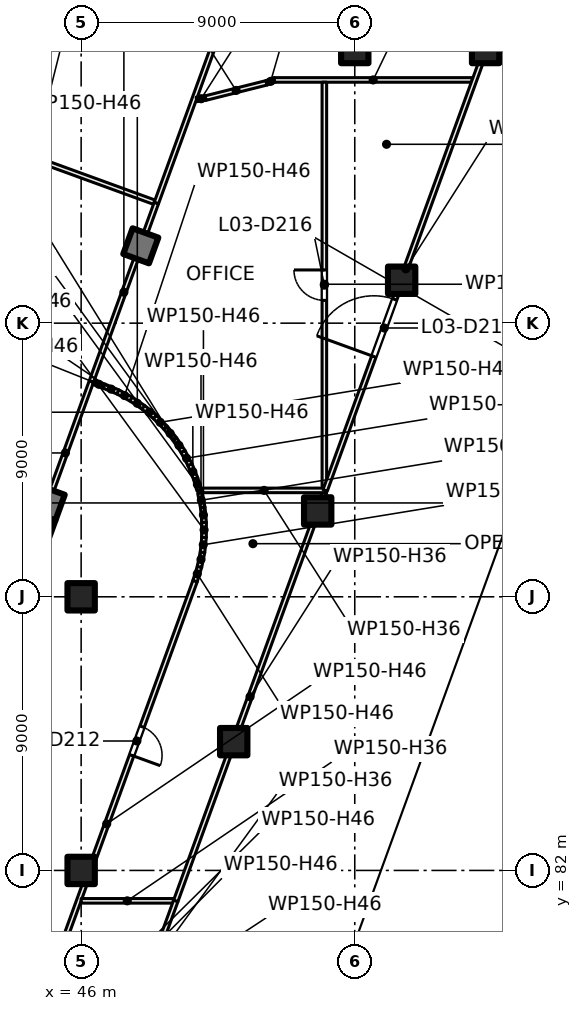
"""IFC4 building model, lengths in metres.
Left out: names, types, materials, properties, quantities, classifications, styles, units other than length and angle.
Written with IfcOpenShell. Run it as: python <this file> out.ifc"""

import sys

from ifc_helpers import new_model, si_unit, direction, frame, frame_2d, origin, origin_2d, place, context, subcontext, project, spatial, rectangle, extrude, element, fill, save


model = new_model("IFC4")
c1 = context("Model", 3, precision=1e-05, world=origin(), true_north=direction((0.0, 1.0)))
c2 = subcontext(c1, "Body", "Model", "MODEL_VIEW")
j1 = project(units=[si_unit("LENGTHUNIT", "METRE"), si_unit("PLANEANGLEUNIT", "RADIAN")], contexts=[c1])
p1 = place(None, origin())
s1 = spatial("IfcSite", under=j1, at=p1, CompositionType="ELEMENT")
p2 = place(p1, origin())
s2 = spatial("IfcBuilding", under=s1, at=p2, CompositionType="ELEMENT")
p3 = place(p2, frame((0.0, 0.0, 17.5)))
s3 = spatial("IfcBuildingStorey", under=s2, at=p3, CompositionType="ELEMENT", Elevation=17.5)
for number, where, z_axis, x_axis in (
    (1, (46.0, 82.0, 0.0), (0.0, 0.0, 1.0), (1.0, 0.0, 0.0)),
    (2, (46.0, 91.0, 0.0), (0.0, 0.0, 1.0), (1.0, 0.0, 0.0)),
    (3, (55.0, 109.0, 0.0), (0.0, 0.0, 1.0), (1.0, 0.0, 0.0)),
    (4, (51.019, 86.236, 0.0), (0.0, 0.0, 1.0), (1.0, 0.0, 0.0)),
    (5, (53.78, 93.824, 0.0), (0.0, 0.0, 1.0), (1.0, 0.0, 0.0)),
    (6, (56.542, 101.412, 0.0), (0.0, 0.0, 1.0), (1.0, 0.0, 0.0)),
    (7, (59.304, 109.0, 0.0), (0.0, 0.0, 1.0), (1.0, 0.0, 0.0)),
    (8, (47.962, 102.544, 0.0), (0.0, 0.0, 1.0), (-0.342, -0.94, 0.0)),
    (9, (44.884, 94.087, 0.0), (0.0, 0.0, 1.0), (-0.342, -0.94, 0.0)),
):
    element("IfcColumn", number, at=place(p3, frame(where, z_axis=z_axis, x_axis=x_axis)), inside=s3, PredefinedType="COLUMN", context=c2, shape_type="SweptSolid", body=[
        extrude(rectangle(XDim=0.9, YDim=0.9, at=origin_2d()), origin(), (0.0, 0.0, 1.0), 5.0),
    ])
p4 = place(p3, frame((41.827, 85.249, 0.0), z_axis=(0.0, 0.0, 1.0), x_axis=(0.342016162452, 0.939694069696, 0.0)))
e10 = element("IfcWall", 10, at=p4, inside=s3, PredefinedType="SHEAR", context=c2, shape_type="SweptSolid", body=[
    extrude(rectangle(XDim=8.9, YDim=0.6, at=frame_2d((4.45, 0.0))), origin(), (0.0, 0.0, 1.0), 5.0),
])
p5 = place(p3, frame((110.368, 100.798, 0.0), z_axis=(0.0, 0.0, 1.0), x_axis=(-0.866702553925, -0.498825303107, 0.0)))
e11 = element("IfcWall", 11, at=p5, inside=s3, PredefinedType="SOLIDWALL", context=c2, shape_type="SweptSolid", body=[
    extrude(rectangle(XDim=66.651, YDim=0.6, at=frame_2d((33.325, 0.0))), origin(), (0.0, 0.0, 1.0), 4.6),
])
p6 = place(p5, frame((0.794, 0.0, 0.9)))
e12 = element("IfcOpeningElement", 12, at=p6, cuts=e11, PredefinedType="OPENING", context=c2, shape_type="SweptSolid", body=[
    extrude(rectangle(XDim=3.0, YDim=3.0, at=frame_2d((1.5, 1.5))), frame((0.0, 0.31, 0.0), z_axis=(0.0, -1.0, 0.0), x_axis=(1.0, 0.0, 0.0)), (0.0, 0.0, 1.0), 0.62),
])
p7 = place(p5, frame((9.542, 0.0, 0.9)))
e13 = element("IfcOpeningElement", 13, at=p7, cuts=e11, PredefinedType="OPENING", context=c2, shape_type="SweptSolid", body=[
    extrude(rectangle(XDim=3.0, YDim=3.0, at=frame_2d((1.5, 1.5))), frame((0.0, 0.31, 0.0), z_axis=(0.0, -1.0, 0.0), x_axis=(1.0, 0.0, 0.0)), (0.0, 0.0, 1.0), 0.62),
])
p8 = place(p5, frame((18.439, 0.0, 0.9)))
e14 = element("IfcOpeningElement", 14, at=p8, cuts=e11, PredefinedType="OPENING", context=c2, shape_type="SweptSolid", body=[
    extrude(rectangle(XDim=3.0, YDim=3.0, at=frame_2d((1.5, 1.5))), frame((0.0, 0.31, 0.0), z_axis=(0.0, -1.0, 0.0), x_axis=(1.0, 0.0, 0.0)), (0.0, 0.0, 1.0), 0.62),
])
p9 = place(p5, frame((27.337, 0.0, 0.9)))
e15 = element("IfcOpeningElement", 15, at=p9, cuts=e11, PredefinedType="OPENING", context=c2, shape_type="SweptSolid", body=[
    extrude(rectangle(XDim=3.0, YDim=3.0, at=frame_2d((1.5, 1.5))), frame((0.0, 0.31, 0.0), z_axis=(0.0, -1.0, 0.0), x_axis=(1.0, 0.0, 0.0)), (0.0, 0.0, 1.0), 0.62),
])
p10 = place(p5, frame((36.234, 0.0, 0.9)))
e16 = element("IfcOpeningElement", 16, at=p10, cuts=e11, PredefinedType="OPENING", context=c2, shape_type="SweptSolid", body=[
    extrude(rectangle(XDim=3.0, YDim=3.0, at=frame_2d((1.5, 1.5))), frame((0.0, 0.31, 0.0), z_axis=(0.0, -1.0, 0.0), x_axis=(1.0, 0.0, 0.0)), (0.0, 0.0, 1.0), 0.62),
])
p11 = place(p5, frame((45.131, 0.0, 0.9)))
e17 = element("IfcOpeningElement", 17, at=p11, cuts=e11, PredefinedType="OPENING", context=c2, shape_type="SweptSolid", body=[
    extrude(rectangle(XDim=3.0, YDim=3.0, at=frame_2d((1.5, 1.5))), frame((0.0, 0.31, 0.0), z_axis=(0.0, -1.0, 0.0), x_axis=(1.0, 0.0, 0.0)), (0.0, 0.0, 1.0), 0.62),
])
p12 = place(p5, frame((54.029, 0.0, 0.9)))
e18 = element("IfcOpeningElement", 18, at=p12, cuts=e11, PredefinedType="OPENING", context=c2, shape_type="SweptSolid", body=[
    extrude(rectangle(XDim=3.0, YDim=3.0, at=frame_2d((1.5, 1.5))), frame((0.0, 0.31, 0.0), z_axis=(0.0, -1.0, 0.0), x_axis=(1.0, 0.0, 0.0)), (0.0, 0.0, 1.0), 0.62),
])
p13 = place(p5, frame((62.776, 0.0, 0.9)))
e19 = element("IfcOpeningElement", 19, at=p13, cuts=e11, PredefinedType="OPENING", context=c2, shape_type="SweptSolid", body=[
    extrude(rectangle(XDim=3.0, YDim=3.0, at=frame_2d((1.5, 1.5))), frame((0.0, 0.31, 0.0), z_axis=(0.0, -1.0, 0.0), x_axis=(1.0, 0.0, 0.0)), (0.0, 0.0, 1.0), 0.62),
])
p14 = place(p3, frame((45.058, 119.563, 0.0), z_axis=(0.0, 0.0, 1.0), x_axis=(-0.342099992172, -0.93966355434, 0.0)))
e20 = element("IfcWall", 20, at=p14, inside=s3, PredefinedType="PARTITIONING", context=c2, shape_type="SweptSolid", body=[
    extrude(rectangle(XDim=13.4, YDim=0.2, at=frame_2d((6.7, 0.0))), origin(), (0.0, 0.0, 1.0), 4.6),
])
p15 = place(p14, frame((4.0, 0.0, 0.0)))
e21 = element("IfcOpeningElement", 21, at=p15, cuts=e20, PredefinedType="OPENING", context=c2, shape_type="SweptSolid", body=[
    extrude(rectangle(XDim=1.0, YDim=2.1, at=frame_2d((0.5, 1.05))), frame((0.0, 0.11, 0.0), z_axis=(0.0, -1.0, 0.0), x_axis=(1.0, 0.0, 0.0)), (0.0, 0.0, 1.0), 0.22),
])
p16 = place(p3, frame((40.44, 106.878, 0.0), z_axis=(0.0, 0.0, 1.0), x_axis=(0.939697516706, -0.342006691597, 0.0)))
e22 = element("IfcWall", 22, at=p16, inside=s3, PredefinedType="PARTITIONING", context=c2, shape_type="SweptSolid", body=[
    extrude(rectangle(XDim=8.476, YDim=0.15, at=frame_2d((4.238, 0.0))), origin(), (0.0, 0.0, 1.0), 4.6),
])
p17 = place(p3, frame((49.749, 91.52, 0.0), z_axis=(0.0, 0.0, 1.0), x_axis=(-0.342022021776, -0.939691937084, 0.0)))
e23 = element("IfcWall", 23, at=p17, inside=s3, PredefinedType="PARTITIONING", context=c2, shape_type="SweptSolid", body=[
    extrude(rectangle(XDim=17.004, YDim=0.15, at=frame_2d((8.502, 0.0))), origin(), (0.0, 0.0, 1.0), 4.6),
])
p18 = place(p17, frame((13.597, 0.0, 0.0)))
e24 = element("IfcOpeningElement", 24, at=p18, cuts=e23, PredefinedType="OPENING", context=c2, shape_type="SweptSolid", body=[
    extrude(rectangle(XDim=1.0, YDim=2.1, at=frame_2d((0.5, 1.05))), frame((0.0, 0.085, 0.0), z_axis=(0.0, -1.0, 0.0), x_axis=(1.0, 0.0, 0.0)), (0.0, 0.0, 1.0), 0.17),
])
p19 = place(p17, frame((5.101, 0.0, 0.0)))
e25 = element("IfcOpeningElement", 25, at=p19, cuts=e23, PredefinedType="OPENING", context=c2, shape_type="SweptSolid", body=[
    extrude(rectangle(XDim=1.0, YDim=2.1, at=frame_2d((0.5, 1.05))), frame((0.0, 0.085, 0.0), z_axis=(0.0, -1.0, 0.0), x_axis=(1.0, 0.0, 0.0)), (0.0, 0.0, 1.0), 0.17),
])
p20 = place(p3, frame((44.627, 93.382, 0.0), z_axis=(0.0, 0.0, 1.0), x_axis=(0.342025351501, 0.939690725149, 0.0)))
e26 = element("IfcWall", 26, at=p20, inside=s3, PredefinedType="PARTITIONING", context=c2, shape_type="SweptSolid", body=[
    extrude(rectangle(XDim=5.0, YDim=0.15, at=frame_2d((2.5, 0.0))), origin(), (0.0, 0.0, 1.0), 4.6),
])
p21 = place(p3, frame((46.0, 81.0, 0.0), z_axis=(0.0, 0.0, 1.0), x_axis=(1.0, 0.0, 0.0)))
e27 = element("IfcWall", 27, at=p21, inside=s3, PredefinedType="PARTITIONING", context=c2, shape_type="SweptSolid", body=[
    extrude(rectangle(XDim=3.033, YDim=0.15, at=frame_2d((1.517, 0.0))), origin(), (0.0, 0.0, 1.0), 3.6),
])
p22 = place(p3, frame((46.407, 98.054, 0.0), z_axis=(0.0, 0.0, 1.0), x_axis=(0.939944328342, -0.341327789109, 0.0)))
e28 = element("IfcWall", 28, at=p22, inside=s3, PredefinedType="PARTITIONING", context=c2, shape_type="SweptSolid", body=[
    extrude(rectangle(XDim=0.378, YDim=0.15, at=frame_2d((0.189, 0.0))), origin(), (0.0, 0.0, 1.0), 4.6),
])
p23 = place(p3, frame((46.337, 98.08, 0.0), z_axis=(0.0, 0.0, 1.0), x_axis=(0.342113136459, 0.939658768842, 0.0)))
e29 = element("IfcWall", 29, at=p23, inside=s3, PredefinedType="PARTITIONING", context=c2, shape_type="SweptSolid", body=[
    extrude(rectangle(XDim=6.25, YDim=0.15, at=frame_2d((3.125, 0.0))), origin(), (0.0, 0.0, 1.0), 4.6),
])
p24 = place(p3, frame((46.758, 97.927, 0.0), z_axis=(0.0, 0.0, 1.0), x_axis=(0.922024303007, -0.387131999019, 0.0)))
e30 = element("IfcWall", 30, at=p24, inside=s3, PredefinedType="PARTITIONING", context=c2, shape_type="SweptSolid", body=[
    extrude(rectangle(XDim=0.496, YDim=0.15, at=frame_2d((0.248, 0.0))), origin(), (0.0, 0.0, 1.0), 4.6),
])
p25 = place(p3, frame((47.209, 97.738, 0.0), z_axis=(0.0, 0.0, 1.0), x_axis=(0.878624509573, -0.47751332042, 0.0)))
e31 = element("IfcWall", 31, at=p25, inside=s3, PredefinedType="PARTITIONING", context=c2, shape_type="SweptSolid", body=[
    extrude(rectangle(XDim=0.499, YDim=0.15, at=frame_2d((0.249, 0.0))), origin(), (0.0, 0.0, 1.0), 4.6),
])
p26 = place(p3, frame((47.608, 76.866, 0.0), z_axis=(0.0, 0.0, 1.0), x_axis=(0.342112853329, 0.939658871925, 0.0)))
e32 = element("IfcWall", 32, at=p26, inside=s3, PredefinedType="PARTITIONING", context=c2, shape_type="SweptSolid", body=[
    extrude(rectangle(XDim=4.399, YDim=0.15, at=frame_2d((2.2, 0.0))), origin(), (0.0, 0.0, 1.0), 3.6),
])
p27 = place(p3, frame((47.641, 97.504, 0.0), z_axis=(0.0, 0.0, 1.0), x_axis=(0.829013848944, -0.559228073561, 0.0)))
e33 = element("IfcWall", 33, at=p27, inside=s3, PredefinedType="PARTITIONING", context=c2, shape_type="SweptSolid", body=[
    extrude(rectangle(XDim=0.497, YDim=0.15, at=frame_2d((0.249, 0.0))), origin(), (0.0, 0.0, 1.0), 4.6),
])
p28 = place(p3, frame((48.047, 97.23, 0.0), z_axis=(0.0, 0.0, 1.0), x_axis=(0.770145329221, -0.637868459699, 0.0)))
e34 = element("IfcWall", 34, at=p28, inside=s3, PredefinedType="PARTITIONING", context=c2, shape_type="SweptSolid", body=[
    extrude(rectangle(XDim=0.498, YDim=0.15, at=frame_2d((0.249, 0.0))), origin(), (0.0, 0.0, 1.0), 4.6),
])
p29 = place(p3, frame((48.425, 96.917, 0.0), z_axis=(0.0, 0.0, 1.0), x_axis=(0.702936615275, -0.711252497293, 0.0)))
e35 = element("IfcWall", 35, at=p29, inside=s3, PredefinedType="PARTITIONING", context=c2, shape_type="SweptSolid", body=[
    extrude(rectangle(XDim=0.499, YDim=0.15, at=frame_2d((0.25, 0.0))), origin(), (0.0, 0.0, 1.0), 4.6),
])
p30 = place(p3, frame((48.475, 103.953, 0.0), z_axis=(0.0, 0.0, 1.0), x_axis=(0.342018860609, 0.939693087656, 0.0)))
e36 = element("IfcWall", 36, at=p30, inside=s3, PredefinedType="PARTITIONING", context=c2, shape_type="SweptSolid", body=[
    extrude(rectangle(XDim=13.575, YDim=0.15, at=frame_2d((6.787, 0.0))), origin(), (0.0, 0.0, 1.0), 4.6),
])
for number, where, z_axis, x_axis in (
    (37, (48.771, 96.568, 0.0), (0.0, 0.0, 1.0), (0.629, -0.778, 0.0)),
    (38, (49.08, 96.187, 0.0), (0.0, 0.0, 1.0), (0.552, -0.834, 0.0)),
):
    element("IfcWall", number, at=place(p3, frame(where, z_axis=z_axis, x_axis=x_axis)), inside=s3, PredefinedType="PARTITIONING", context=c2, shape_type="SweptSolid", body=[
        extrude(rectangle(XDim=0.498, YDim=0.15, at=frame_2d((0.249, 0.0))), origin(), (0.0, 0.0, 1.0), 4.6),
    ])
p31 = place(p3, frame((49.113, 81.0, 0.0), z_axis=(0.0, 0.0, 1.0), x_axis=(0.341994090833, 0.939702102709, 0.0)))
e39 = element("IfcWall", 39, at=p31, inside=s3, PredefinedType="PARTITIONING", context=c2, shape_type="SweptSolid", body=[
    extrude(rectangle(XDim=14.29, YDim=0.15, at=frame_2d((7.145, 0.0))), origin(), (0.0, 0.0, 1.0), 3.6),
])
p32 = place(p3, frame((49.351, 95.778, 0.0), z_axis=(0.0, 0.0, 1.0), x_axis=(0.46615085347, -0.884705251374, 0.0)))
e40 = element("IfcWall", 40, at=p32, inside=s3, PredefinedType="PARTITIONING", context=c2, shape_type="SweptSolid", body=[
    extrude(rectangle(XDim=0.498, YDim=0.15, at=frame_2d((0.249, 0.0))), origin(), (0.0, 0.0, 1.0), 4.6),
])
p33 = place(p3, frame((49.58, 95.344, 0.0), z_axis=(0.0, 0.0, 1.0), x_axis=(0.378326719955, -0.925672130383, 0.0)))
e41 = element("IfcWall", 41, at=p33, inside=s3, PredefinedType="PARTITIONING", context=c2, shape_type="SweptSolid", body=[
    extrude(rectangle(XDim=0.497, YDim=0.15, at=frame_2d((0.249, 0.0))), origin(), (0.0, 0.0, 1.0), 4.6),
])
p34 = place(p3, frame((49.794, 107.359, 0.0), z_axis=(0.0, 0.0, 1.0), x_axis=(0.988901730308, 0.148571086668, 0.0)))
e42 = element("IfcWall", 42, at=p34, inside=s3, PredefinedType="PARTITIONING", context=c2, shape_type="SweptSolid", body=[
    extrude(rectangle(XDim=0.311, YDim=0.15, at=frame_2d((0.155, 0.0))), origin(), (0.0, 0.0, 1.0), 4.6),
])
p35 = place(p3, frame((49.747, 91.516, 0.0), z_axis=(0.0, 0.0, 1.0), x_axis=(0.296228958727, 0.955116958289, 0.0)))
e43 = element("IfcWall", 43, at=p35, inside=s3, PredefinedType="PARTITIONING", context=c2, shape_type="SweptSolid", body=[
    extrude(rectangle(XDim=0.496, YDim=0.15, at=frame_2d((0.248, 0.0))), origin(), (0.0, 0.0, 1.0), 4.6),
])
p36 = place(p3, frame((49.766, 94.891, 0.0), z_axis=(0.0, 0.0, 1.0), x_axis=(0.284271713428, -0.958743757708, 0.0)))
e44 = element("IfcWall", 44, at=p36, inside=s3, PredefinedType="PARTITIONING", context=c2, shape_type="SweptSolid", body=[
    extrude(rectangle(XDim=0.408, YDim=0.15, at=frame_2d((0.204, 0.0))), origin(), (0.0, 0.0, 1.0), 4.6),
])
p37 = place(p3, frame((49.96, 94.5, 0.0), z_axis=(0.0, 0.0, 1.0), x_axis=(1.0, 0.0, 0.0)))
e45 = element("IfcWall", 45, at=p37, inside=s3, PredefinedType="PARTITIONING", context=c2, shape_type="SweptSolid", body=[
    extrude(rectangle(XDim=4.115, YDim=0.15, at=frame_2d((2.058, 0.0))), origin(), (0.0, 0.0, 1.0), 3.6),
])
p38 = place(p3, frame((49.892, 91.983, 0.0), z_axis=(0.0, 0.0, 1.0), x_axis=(0.202330199798, 0.979317359312, 0.0)))
e46 = element("IfcWall", 46, at=p38, inside=s3, PredefinedType="PARTITIONING", context=c2, shape_type="SweptSolid", body=[
    extrude(rectangle(XDim=0.498, YDim=0.15, at=frame_2d((0.249, 0.0))), origin(), (0.0, 0.0, 1.0), 4.6),
])
p39 = place(p3, frame((49.906, 94.42, 0.0), z_axis=(0.0, 0.0, 1.0), x_axis=(0.190646652196, -0.981658725834, 0.0)))
e47 = element("IfcWall", 47, at=p39, inside=s3, PredefinedType="PARTITIONING", context=c2, shape_type="SweptSolid", body=[
    extrude(rectangle(XDim=0.498, YDim=0.15, at=frame_2d((0.249, 0.0))), origin(), (0.0, 0.0, 1.0), 4.6),
])
p40 = place(p3, frame((49.992, 92.463, 0.0), z_axis=(0.0, 0.0, 1.0), x_axis=(0.102314560958, 0.994752095055, 0.0)))
e48 = element("IfcWall", 48, at=p40, inside=s3, PredefinedType="PARTITIONING", context=c2, shape_type="SweptSolid", body=[
    extrude(rectangle(XDim=0.499, YDim=0.15, at=frame_2d((0.25, 0.0))), origin(), (0.0, 0.0, 1.0), 4.6),
])
for number, where, z_axis, x_axis in (
    (49, (50.0, 93.939, 0.0), (0.0, 0.0, 1.0), (0.09, -0.996, 0.0)),
    (50, (50.043, 92.951, 0.0), (0.0, 0.0, 1.0), (0.004, 1.0, 0.0)),
):
    element("IfcWall", number, at=place(p3, frame(where, z_axis=z_axis, x_axis=x_axis)), inside=s3, PredefinedType="PARTITIONING", context=c2, shape_type="SweptSolid", body=[
        extrude(rectangle(XDim=0.499, YDim=0.15, at=frame_2d((0.25, 0.0))), origin(), (0.0, 0.0, 1.0), 4.6),
    ])
p41 = place(p3, frame((50.093, 107.403, 0.0), z_axis=(0.0, 0.0, 1.0), x_axis=(0.970121672102, 0.24261892201, 0.0)))
e51 = element("IfcWall", 51, at=p41, inside=s3, PredefinedType="PARTITIONING", context=c2, shape_type="SweptSolid", body=[
    extrude(rectangle(XDim=2.069, YDim=0.15, at=frame_2d((1.034, 0.0))), origin(), (0.0, 0.0, 1.0), 4.6),
])
p42 = place(p3, frame((52.093, 107.903, 0.0), z_axis=(0.0, 0.0, 1.0), x_axis=(0.941980718737, 0.335666986056, 0.0)))
e52 = element("IfcWall", 52, at=p42, inside=s3, PredefinedType="PARTITIONING", context=c2, shape_type="SweptSolid", body=[
    extrude(rectangle(XDim=0.3, YDim=0.15, at=frame_2d((0.15, 0.0))), origin(), (0.0, 0.0, 1.0), 4.6),
])
p43 = place(p3, frame((52.351, 108.0, 0.0), z_axis=(0.0, 0.0, 1.0), x_axis=(1.0, 0.0, 0.0)))
e53 = element("IfcWall", 53, at=p43, inside=s3, PredefinedType="PARTITIONING", context=c2, shape_type="SweptSolid", body=[
    extrude(rectangle(XDim=6.509, YDim=0.15, at=frame_2d((3.254, 0.0))), origin(), (0.0, 0.0, 1.0), 3.6),
])
p44 = place(p3, frame((54.0, 107.925, 0.0), z_axis=(0.0, 0.0, 1.0), x_axis=(0.0, -1.0, 0.0)))
e54 = element("IfcWall", 54, at=p44, inside=s3, PredefinedType="PARTITIONING", context=c2, shape_type="SweptSolid", body=[
    extrude(rectangle(XDim=13.29, YDim=0.15, at=frame_2d((6.645, 0.0))), origin(), (0.0, 0.0, 1.0), 3.6),
])
p45 = place(p44, frame((6.175, 0.0, 0.0)))
e55 = element("IfcOpeningElement", 55, at=p45, cuts=e54, PredefinedType="OPENING", context=c2, shape_type="SweptSolid", body=[
    extrude(rectangle(XDim=1.0, YDim=2.1, at=frame_2d((0.5, 1.05))), frame((0.0, 0.085, 0.0), z_axis=(0.0, -1.0, 0.0), x_axis=(1.0, 0.0, 0.0)), (0.0, 0.0, 1.0), 0.17),
])
p46 = place(p3, frame((54.026, 94.5, 0.0), z_axis=(0.0, 0.0, 1.0), x_axis=(0.342084382251, 0.939669237243, 0.0)))
e56 = element("IfcWall", 56, at=p46, inside=s3, PredefinedType="PARTITIONING", context=c2, shape_type="SweptSolid", body=[
    extrude(rectangle(XDim=15.506, YDim=0.15, at=frame_2d((7.753, 0.0))), origin(), (0.0, 0.0, 1.0), 3.6),
])
p47 = place(p46, frame((4.684, 0.0, 0.0)))
e57 = element("IfcOpeningElement", 57, at=p47, cuts=e56, PredefinedType="OPENING", context=c2, shape_type="SweptSolid", body=[
    extrude(rectangle(XDim=2.0, YDim=2.1, at=frame_2d((1.0, 1.05))), frame((0.0, 0.085, 0.0), z_axis=(0.0, -1.0, 0.0), x_axis=(1.0, 0.0, 0.0)), (0.0, 0.0, 1.0), 0.17),
])
p48 = place(p19, origin())
e58 = element("IfcDoor", 58, at=p48, inside=s3, OperationType="SINGLE_SWING_RIGHT", PredefinedType="DOOR", context=c2, shape_type="SweptSolid", body=[
    extrude(rectangle(XDim=1.0, YDim=2.1, at=frame_2d((0.5, 1.05))), frame((0.0, 0.025, 0.0), z_axis=(0.0, -1.0, 0.0), x_axis=(1.0, 0.0, 0.0)), (0.0, 0.0, 1.0), 0.05),
])
fill(e25, e58)
p49 = place(p45, origin())
e59 = element("IfcDoor", 59, at=p49, inside=s3, OperationType="SINGLE_SWING_LEFT", PredefinedType="DOOR", context=c2, shape_type="SweptSolid", body=[
    extrude(rectangle(XDim=1.0, YDim=2.1, at=frame_2d((0.5, 1.05))), frame((0.0, 0.025, 0.0), z_axis=(0.0, -1.0, 0.0), x_axis=(1.0, 0.0, 0.0)), (0.0, 0.0, 1.0), 0.05),
])
fill(e55, e59)
p50 = place(p47, origin())
e60 = element("IfcDoor", 60, at=p50, inside=s3, OperationType="DOUBLE_DOOR_SINGLE_SWING", PredefinedType="DOOR", context=c2, shape_type="SweptSolid", body=[
    extrude(rectangle(XDim=2.0, YDim=2.1, at=frame_2d((1.0, 1.05))), frame((0.0, 0.025, 0.0), z_axis=(0.0, -1.0, 0.0), x_axis=(1.0, 0.0, 0.0)), (0.0, 0.0, 1.0), 0.05),
])
fill(e57, e60)
save(model, sys.argv[1])
